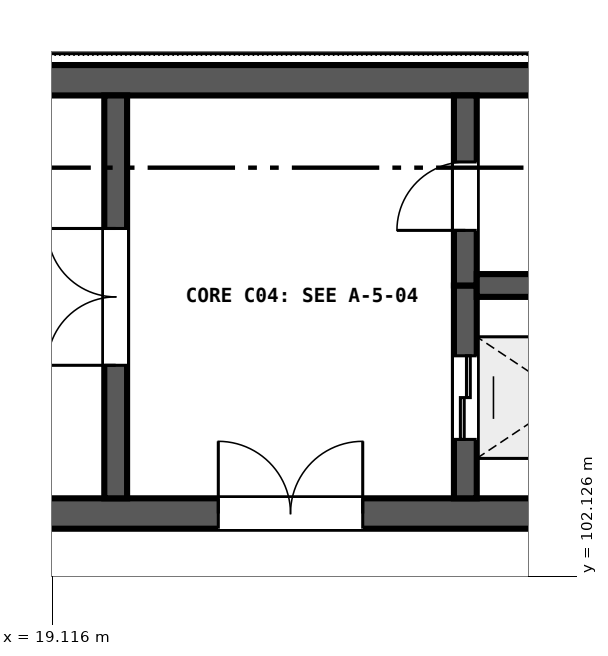
"""IFC4 building model, lengths in metres.
Left out: names, types, materials, properties, quantities, classifications, styles, units other than length and angle.
Written with IfcOpenShell. Run it as: python <this file> out.ifc"""

import sys

from ifc_helpers import new_model, si_unit, direction, frame, frame_2d, origin, place, context, subcontext, project, spatial, rectangle, extrude, element, fill, save


model = new_model("IFC4")
c1 = context("Model", 3, precision=1e-05, world=origin(), true_north=direction((0.0, 1.0)))
c2 = subcontext(c1, "Body", "Model", "MODEL_VIEW")
j1 = project(units=[si_unit("LENGTHUNIT", "METRE"), si_unit("PLANEANGLEUNIT", "RADIAN")], contexts=[c1])
p1 = place(None, origin())
s1 = spatial("IfcSite", under=j1, at=p1, CompositionType="ELEMENT")
p2 = place(p1, origin())
s2 = spatial("IfcBuilding", under=s1, at=p2, CompositionType="ELEMENT")
p3 = place(p2, origin())
s3 = spatial("IfcBuildingStorey", under=s2, at=p3, CompositionType="ELEMENT", Elevation=0.0)
p4 = place(p3, frame((9.9, 102.95, 0.0), z_axis=(0.0, 0.0, 1.0), x_axis=(1.0, 0.0, 0.0)))
e1 = element("IfcWall", 1, at=p4, inside=s3, PredefinedType="SHEAR", context=c2, shape_type="SweptSolid", body=[
    extrude(rectangle(XDim=18.0, YDim=0.4, at=frame_2d((9.0, 0.0))), origin(), (0.0, 0.0, 1.0), 4.5),
])
p5 = place(p4, frame((11.4, 0.0, 0.0)))
e2 = element("IfcOpeningElement", 2, at=p5, cuts=e1, PredefinedType="OPENING", context=c2, shape_type="SweptSolid", body=[
    extrude(rectangle(XDim=1.9, YDim=2.25, at=frame_2d((0.95, 1.125))), frame((0.0, 0.21, 0.0), z_axis=(0.0, -1.0, 0.0), x_axis=(1.0, 0.0, 0.0)), (0.0, 0.0, 1.0), 0.42),
])
p6 = place(p3, frame((27.9, 108.65, 0.0), z_axis=(0.0, 0.0, 1.0), x_axis=(-1.0, 0.0, 0.0)))
e3 = element("IfcWall", 3, at=p6, inside=s3, PredefinedType="SHEAR", context=c2, shape_type="SweptSolid", body=[
    extrude(rectangle(XDim=18.0, YDim=0.4, at=frame_2d((9.0, 0.0))), origin(), (0.0, 0.0, 1.0), 4.5),
])
p7 = place(p3, frame((19.95, 103.15, 0.0), z_axis=(0.0, 0.0, 1.0), x_axis=(0.0, 1.0, 0.0)))
e4 = element("IfcWall", 4, at=p7, inside=s3, PredefinedType="SHEAR", context=c2, shape_type="SweptSolid", body=[
    extrude(rectangle(XDim=5.3, YDim=0.3, at=frame_2d((2.65, 0.0))), origin(), (0.0, 0.0, 1.0), 4.5),
])
p8 = place(p7, frame((1.75, 0.0, 0.0)))
e5 = element("IfcOpeningElement", 5, at=p8, cuts=e4, PredefinedType="OPENING", context=c2, shape_type="SweptSolid", body=[
    extrude(rectangle(XDim=1.8, YDim=2.25, at=frame_2d((0.9, 1.125))), frame((0.0, 0.16, 0.0), z_axis=(0.0, -1.0, 0.0), x_axis=(1.0, 0.0, 0.0)), (0.0, 0.0, 1.0), 0.32),
])
p9 = place(p3, frame((24.55, 103.15, 0.0), z_axis=(0.0, 0.0, 1.0), x_axis=(0.0, 1.0, 0.0)))
e6 = element("IfcWall", 6, at=p9, inside=s3, PredefinedType="SHEAR", context=c2, shape_type="SweptSolid", body=[
    extrude(rectangle(XDim=2.8, YDim=0.3, at=frame_2d((1.4, 0.0))), origin(), (0.0, 0.0, 1.0), 4.5),
])
p10 = place(p9, frame((0.775, 0.0, 0.0)))
e7 = element("IfcOpeningElement", 7, at=p10, cuts=e6, PredefinedType="OPENING", context=c2, shape_type="SweptSolid", body=[
    extrude(rectangle(XDim=1.1, YDim=2.1, at=frame_2d((0.55, 1.05))), frame((0.0, 0.16, 0.0), z_axis=(0.0, -1.0, 0.0), x_axis=(1.0, 0.0, 0.0)), (0.0, 0.0, 1.0), 0.32),
])
p11 = place(p3, frame((24.55, 105.95, 0.0), z_axis=(0.0, 0.0, 1.0), x_axis=(0.0, 1.0, 0.0)))
e8 = element("IfcWall", 8, at=p11, inside=s3, PredefinedType="SHEAR", context=c2, shape_type="SweptSolid", body=[
    extrude(rectangle(XDim=2.5, YDim=0.3, at=frame_2d((1.25, 0.0))), origin(), (0.0, 0.0, 1.0), 4.5),
])
p12 = place(p11, frame((0.725, 0.0, 0.0)))
e9 = element("IfcOpeningElement", 9, at=p12, cuts=e8, PredefinedType="OPENING", context=c2, shape_type="SweptSolid", body=[
    extrude(rectangle(XDim=0.9, YDim=2.1, at=frame_2d((0.45, 1.05))), frame((0.0, 0.16, 0.0), z_axis=(0.0, -1.0, 0.0), x_axis=(1.0, 0.0, 0.0)), (0.0, 0.0, 1.0), 0.32),
])
p13 = place(p3, frame((24.7, 105.95, 0.0), z_axis=(0.0, 0.0, 1.0), x_axis=(1.0, 0.0, 0.0)))
e10 = element("IfcWall", 10, at=p13, inside=s3, PredefinedType="SHEAR", context=c2, shape_type="SweptSolid", body=[
    extrude(rectangle(XDim=2.85, YDim=0.3, at=frame_2d((1.425, 0.0))), origin(), (0.0, 0.0, 1.0), 4.5),
])
p14 = place(p8, origin())
e11 = element("IfcDoor", 11, at=p14, inside=s3, OperationType="DOUBLE_DOOR_SINGLE_SWING", PredefinedType="DOOR", context=c2, shape_type="SweptSolid", body=[
    extrude(rectangle(XDim=1.8, YDim=2.25, at=frame_2d((0.9, 1.125))), frame((0.0, 0.025, 0.0), z_axis=(0.0, -1.0, 0.0), x_axis=(1.0, 0.0, 0.0)), (0.0, 0.0, 1.0), 0.05),
])
fill(e5, e11)
p15 = place(p12, origin())
e12 = element("IfcDoor", 12, at=p15, inside=s3, OperationType="SINGLE_SWING_LEFT", PredefinedType="DOOR", context=c2, shape_type="SweptSolid", body=[
    extrude(rectangle(XDim=0.9, YDim=2.1, at=frame_2d((0.45, 1.05))), frame((0.0, 0.025, 0.0), z_axis=(0.0, -1.0, 0.0), x_axis=(1.0, 0.0, 0.0)), (0.0, 0.0, 1.0), 0.05),
])
fill(e9, e12)
p16 = place(p10, origin())
e13 = element("IfcDoor", 13, at=p16, inside=s3, OperationType="DOUBLE_DOOR_SLIDING", PredefinedType="DOOR", context=c2, shape_type="SweptSolid", body=[
    extrude(rectangle(XDim=1.1, YDim=2.1, at=frame_2d((0.55, 1.05))), frame((0.0, 0.025, 0.0), z_axis=(0.0, -1.0, 0.0), x_axis=(1.0, 0.0, 0.0)), (0.0, 0.0, 1.0), 0.05),
])
fill(e7, e13)
p17 = place(p5, origin())
e14 = element("IfcDoor", 14, at=p17, inside=s3, OperationType="DOUBLE_DOOR_SINGLE_SWING", PredefinedType="DOOR", context=c2, shape_type="SweptSolid", body=[
    extrude(rectangle(XDim=1.9, YDim=2.25, at=frame_2d((0.95, 1.125))), frame((0.0, 0.025, 0.0), z_axis=(0.0, -1.0, 0.0), x_axis=(1.0, 0.0, 0.0)), (0.0, 0.0, 1.0), 0.05),
])
fill(e2, e14)
save(model, sys.argv[1])
